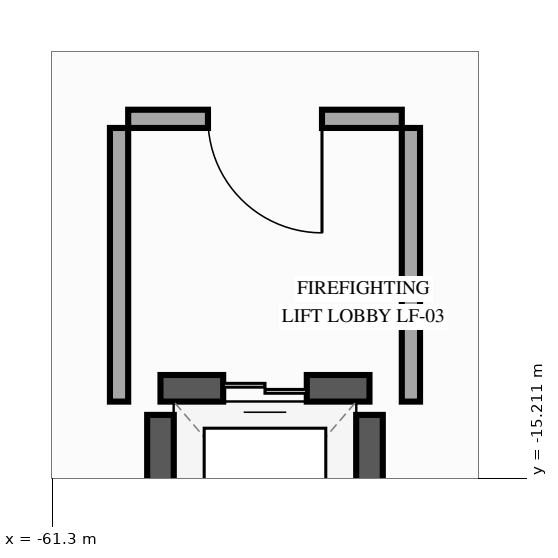
"""IFC4 building model, lengths in metres.
Left out: names, types, materials, properties, quantities, classifications, styles, units other than length and angle.
Written with IfcOpenShell. Run it as: python <this file> out.ifc"""

import sys

from ifc_helpers import new_model, si_unit, direction, frame, frame_2d, origin, place, context, subcontext, project, spatial, rectangle, extrude, element, fill, save


model = new_model("IFC4")
c1 = context("Model", 3, precision=1e-05, world=origin(), true_north=direction((0.0, 1.0)))
c2 = subcontext(c1, "Body", "Model", "MODEL_VIEW")
j1 = project(units=[si_unit("LENGTHUNIT", "METRE"), si_unit("PLANEANGLEUNIT", "RADIAN")], contexts=[c1])
p1 = place(None, origin())
s1 = spatial("IfcSite", under=j1, at=p1, CompositionType="ELEMENT")
p2 = place(p1, origin())
s2 = spatial("IfcBuilding", under=s1, at=p2, CompositionType="ELEMENT")
p3 = place(p2, frame((0.0, 0.0, 27.0)))
s3 = spatial("IfcBuildingStorey", under=s2, at=p3, CompositionType="ELEMENT", Elevation=27.0)
p4 = place(p3, frame((-57.125, -14.025, 0.0), z_axis=(0.0, 0.0, 1.0), x_axis=(-1.0, 0.0, 0.0)))
e1 = element("IfcWall", 1, at=p4, inside=s3, PredefinedType="SHEAR", context=c2, shape_type="SweptSolid", body=[
    extrude(rectangle(XDim=2.75, YDim=0.35, at=frame_2d((1.375, 0.0))), origin(), (0.0, 0.0, 1.0), 5.15),
])
p5 = place(p4, frame((0.825, 0.0, 0.0)))
e2 = element("IfcOpeningElement", 2, at=p5, cuts=e1, PredefinedType="OPENING", context=c2, shape_type="SweptSolid", body=[
    extrude(rectangle(XDim=1.1, YDim=2.2, at=frame_2d((0.55, 1.1))), frame((0.0, 0.185, 0.0), z_axis=(0.0, -1.0, 0.0), x_axis=(1.0, 0.0, 0.0)), (0.0, 0.0, 1.0), 0.37),
])
for number, where, z_axis, x_axis in (
    (3, (-59.875, -16.825, 0.0), (0.0, 0.0, 1.0), (0.0, 1.0, 0.0)),
    (4, (-57.125, -16.825, 0.0), (0.0, 0.0, 1.0), (0.0, 1.0, 0.0)),
):
    element("IfcWall", number, at=place(p3, frame(where, z_axis=z_axis, x_axis=x_axis)), inside=s3, PredefinedType="SHEAR", context=c2, shape_type="SweptSolid", body=[
        extrude(rectangle(XDim=2.45, YDim=0.35, at=frame_2d((1.225, 0.0))), origin(), (0.0, 0.0, 1.0), 5.15),
    ])
p6 = place(p3, frame((-56.7, -10.48, 0.0), z_axis=(0.0, 0.0, 1.0), x_axis=(-1.0, 0.0, 0.0)))
e5 = element("IfcWall", 5, at=p6, inside=s3, PredefinedType="PARTITIONING", context=c2, shape_type="SweptSolid", body=[
    extrude(rectangle(XDim=3.6, YDim=0.24, at=frame_2d((1.8, 0.0))), origin(), (0.0, 0.0, 1.0), 5.1),
])
p7 = place(p6, frame((1.05, 0.0, 0.0)))
e6 = element("IfcOpeningElement", 6, at=p7, cuts=e5, PredefinedType="OPENING", context=c2, shape_type="SweptSolid", body=[
    extrude(rectangle(XDim=1.5, YDim=2.2, at=frame_2d((0.75, 1.1))), frame((0.0, 0.13, 0.0), z_axis=(0.0, -1.0, 0.0), x_axis=(1.0, 0.0, 0.0)), (0.0, 0.0, 1.0), 0.26),
])
for number, where, z_axis, x_axis in (
    (7, (-60.42, -14.2, 0.0), (0.0, 0.0, 1.0), (0.0, 1.0, 0.0)),
    (8, (-56.58, -14.2, 0.0), (0.0, 0.0, 1.0), (0.0, 1.0, 0.0)),
):
    element("IfcWall", number, at=place(p3, frame(where, z_axis=z_axis, x_axis=x_axis)), inside=s3, PredefinedType="PARTITIONING", context=c2, shape_type="SweptSolid", body=[
        extrude(rectangle(XDim=3.6, YDim=0.24, at=frame_2d((1.8, 0.0))), origin(), (0.0, 0.0, 1.0), 5.1),
    ])
p8 = place(p5, origin())
e9 = element("IfcDoor", 9, at=p8, inside=s3, OperationType="DOUBLE_DOOR_SLIDING", PredefinedType="DOOR", context=c2, shape_type="SweptSolid", body=[
    extrude(rectangle(XDim=1.1, YDim=2.2, at=frame_2d((0.55, 1.1))), frame((0.0, 0.025, 0.0), z_axis=(0.0, -1.0, 0.0), x_axis=(1.0, 0.0, 0.0)), (0.0, 0.0, 1.0), 0.05),
])
fill(e2, e9)
p9 = place(p7, origin())
e10 = element("IfcDoor", 10, at=p9, inside=s3, OperationType="SINGLE_SWING_LEFT", PredefinedType="DOOR", context=c2, shape_type="SweptSolid", body=[
    extrude(rectangle(XDim=1.5, YDim=2.2, at=frame_2d((0.75, 1.1))), frame((0.0, 0.025, 0.0), z_axis=(0.0, -1.0, 0.0), x_axis=(1.0, 0.0, 0.0)), (0.0, 0.0, 1.0), 0.05),
])
fill(e6, e10)
save(model, sys.argv[1])
